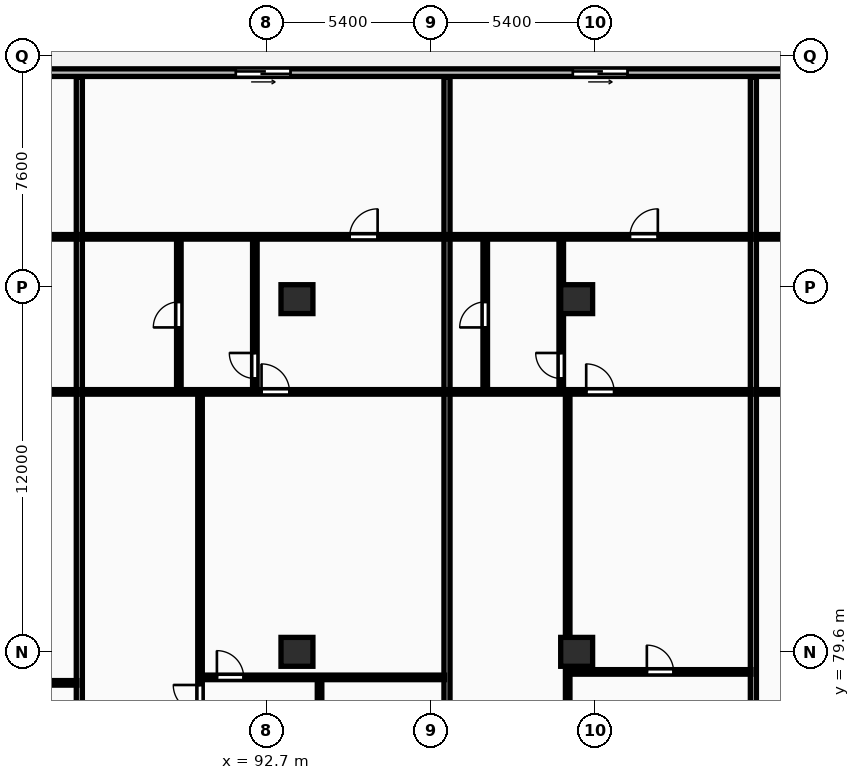
"""IFC4 building model, lengths in metres.
Left out: names, types, materials, properties, quantities, classifications, styles, units other than length and angle.
Written with IfcOpenShell. Run it as: python <this file> out.ifc"""

import sys

from ifc_helpers import new_model, si_unit, direction, frame, frame_2d, origin, origin_2d, place, context, subcontext, project, spatial, rectangle, extrude, element, fill, save


model = new_model("IFC4")
c1 = context("Model", 3, precision=1e-05, world=origin(), true_north=direction((0.0, 1.0)))
c2 = subcontext(c1, "Body", "Model", "MODEL_VIEW")
j1 = project(units=[si_unit("LENGTHUNIT", "METRE"), si_unit("PLANEANGLEUNIT", "RADIAN")], contexts=[c1])
p1 = place(None, origin())
s1 = spatial("IfcSite", under=j1, at=p1, CompositionType="ELEMENT")
p2 = place(p1, origin())
s2 = spatial("IfcBuilding", under=s1, at=p2, CompositionType="ELEMENT")
p3 = place(p2, frame((0.0, 0.0, 24.0)))
s3 = spatial("IfcBuildingStorey", under=s2, at=p3, CompositionType="ELEMENT", Elevation=24.0)
for number, where, z_axis, x_axis in (
    (1, (93.7, 79.6, 0.0), (0.0, 0.0, 1.0), (1.0, 0.0, 0.0)),
    (2, (93.7, 91.2, 0.0), (0.0, 0.0, 1.0), (1.0, 0.0, 0.0)),
    (3, (102.9, 79.6, 0.0), (0.0, 0.0, 1.0), (1.0, 0.0, 0.0)),
    (4, (102.9, 91.2, 0.0), (0.0, 0.0, 1.0), (1.0, 0.0, 0.0)),
):
    element("IfcColumn", number, at=place(p3, frame(where, z_axis=z_axis, x_axis=x_axis)), inside=s3, PredefinedType="COLUMN", context=c2, shape_type="SweptSolid", body=[
        extrude(rectangle(XDim=1.05, YDim=0.95, at=origin_2d()), origin(), (0.0, 0.0, 1.0), 3.25),
    ])
p4 = place(p3, frame((132.9, 98.65, 0.0), z_axis=(0.0, 0.0, 1.0), x_axis=(-1.0, 0.0, 0.0)))
e5 = element("IfcWall", 5, at=p4, inside=s3, PredefinedType="STANDARD", context=c2, shape_type="SweptSolid", body=[
    extrude(rectangle(XDim=77.6, YDim=0.25, at=frame_2d((38.8, 0.0))), origin(), (0.0, 0.0, 1.0), 2.97),
])
p5 = place(p4, frame((71.661, 0.0, 0.0)))
e6 = element("IfcOpeningElement", 6, at=p5, cuts=e5, PredefinedType="OPENING", context=c2, shape_type="SweptSolid", body=[
    extrude(rectangle(XDim=1.8, YDim=2.2, at=frame_2d((0.9, 1.1))), frame((0.0, 0.135, 0.0), z_axis=(0.0, -1.0, 0.0), x_axis=(1.0, 0.0, 0.0)), (0.0, 0.0, 1.0), 0.27),
])
p6 = place(p4, frame((61.079, 0.0, 0.0)))
e7 = element("IfcOpeningElement", 7, at=p6, cuts=e5, PredefinedType="OPENING", context=c2, shape_type="SweptSolid", body=[
    extrude(rectangle(XDim=1.8, YDim=2.2, at=frame_2d((0.9, 1.1))), frame((0.0, 0.135, 0.0), z_axis=(0.0, -1.0, 0.0), x_axis=(1.0, 0.0, 0.0)), (0.0, 0.0, 1.0), 0.27),
])
p7 = place(p4, frame((50.498, 0.0, 0.0)))
e8 = element("IfcOpeningElement", 8, at=p7, cuts=e5, PredefinedType="OPENING", context=c2, shape_type="SweptSolid", body=[
    extrude(rectangle(XDim=1.8, YDim=2.2, at=frame_2d((0.9, 1.1))), frame((0.0, 0.135, 0.0), z_axis=(0.0, -1.0, 0.0), x_axis=(1.0, 0.0, 0.0)), (0.0, 0.0, 1.0), 0.27),
])
p8 = place(p4, frame((39.412, 0.0, 0.0)))
e9 = element("IfcOpeningElement", 9, at=p8, cuts=e5, PredefinedType="OPENING", context=c2, shape_type="SweptSolid", body=[
    extrude(rectangle(XDim=1.8, YDim=2.2, at=frame_2d((0.9, 1.1))), frame((0.0, 0.135, 0.0), z_axis=(0.0, -1.0, 0.0), x_axis=(1.0, 0.0, 0.0)), (0.0, 0.0, 1.0), 0.27),
])
p9 = place(p4, frame((28.326, 0.0, 0.0)))
e10 = element("IfcOpeningElement", 10, at=p9, cuts=e5, PredefinedType="OPENING", context=c2, shape_type="SweptSolid", body=[
    extrude(rectangle(XDim=1.8, YDim=2.2, at=frame_2d((0.9, 1.1))), frame((0.0, 0.135, 0.0), z_axis=(0.0, -1.0, 0.0), x_axis=(1.0, 0.0, 0.0)), (0.0, 0.0, 1.0), 0.27),
])
p10 = place(p4, frame((17.744, 0.0, 0.0)))
e11 = element("IfcOpeningElement", 11, at=p10, cuts=e5, PredefinedType="OPENING", context=c2, shape_type="SweptSolid", body=[
    extrude(rectangle(XDim=1.8, YDim=2.2, at=frame_2d((0.9, 1.1))), frame((0.0, 0.135, 0.0), z_axis=(0.0, -1.0, 0.0), x_axis=(1.0, 0.0, 0.0)), (0.0, 0.0, 1.0), 0.27),
])
p11 = place(p4, frame((6.901, 0.0, 0.0)))
e12 = element("IfcOpeningElement", 12, at=p11, cuts=e5, PredefinedType="OPENING", context=c2, shape_type="SweptSolid", body=[
    extrude(rectangle(XDim=1.8, YDim=2.2, at=frame_2d((0.9, 1.1))), frame((0.0, 0.135, 0.0), z_axis=(0.0, -1.0, 0.0), x_axis=(1.0, 0.0, 0.0)), (0.0, 0.0, 1.0), 0.27),
])
p12 = place(p4, frame((0.6, 0.0, 0.85)))
e13 = element("IfcOpeningElement", 13, at=p12, cuts=e5, PredefinedType="OPENING", context=c2, shape_type="SweptSolid", body=[
    extrude(rectangle(XDim=1.8, YDim=1.8, at=frame_2d((0.9, 0.9))), frame((0.0, 0.135, 0.0), z_axis=(0.0, -1.0, 0.0), x_axis=(1.0, 0.0, 0.0)), (0.0, 0.0, 1.0), 0.27),
])
p13 = place(p3, frame((86.542, 69.43, 0.0), z_axis=(0.0, 0.0, 1.0), x_axis=(0.0, 1.0, 0.0)))
e14 = element("IfcWall", 14, at=p13, inside=s3, PredefinedType="PARTITIONING", context=c2, shape_type="SweptSolid", body=[
    extrude(rectangle(XDim=29.07, YDim=0.2, at=frame_2d((14.535, 0.0))), origin(), (0.0, 0.0, 1.0), 2.97),
])
p14 = place(p3, frame((80.494, 78.58, 0.0), z_axis=(0.0, 0.0, 1.0), x_axis=(1.0, 0.0, 0.0)))
e15 = element("IfcWall", 15, at=p14, inside=s3, PredefinedType="PARTITIONING", context=c2, shape_type="SweptSolid", body=[
    extrude(rectangle(XDim=5.968, YDim=0.15, at=frame_2d((2.984, 0.0))), origin(), (0.0, 0.0, 1.0), 2.97),
])
p15 = place(p14, frame((1.403, 0.0, 0.0)))
e16 = element("IfcOpeningElement", 16, at=p15, cuts=e15, PredefinedType="OPENING", context=c2, shape_type="SweptSolid", body=[
    extrude(rectangle(XDim=0.88, YDim=2.06, at=frame_2d((0.44, 1.03))), frame((0.0, 0.085, 0.0), z_axis=(0.0, -1.0, 0.0), x_axis=(1.0, 0.0, 0.0)), (0.0, 0.0, 1.0), 0.17),
])
p16 = place(p3, frame((76.544, 88.15, 0.0), z_axis=(0.0, 0.0, 1.0), x_axis=(1.0, 0.0, 0.0)))
e17 = element("IfcWall", 17, at=p16, inside=s3, PredefinedType="PARTITIONING", context=c2, shape_type="SweptSolid", body=[
    extrude(rectangle(XDim=9.918, YDim=0.15, at=frame_2d((4.959, 0.0))), origin(), (0.0, 0.0, 1.0), 2.97),
])
p17 = place(p16, frame((4.499, 0.0, 0.0)))
e18 = element("IfcOpeningElement", 18, at=p17, cuts=e17, PredefinedType="OPENING", context=c2, shape_type="SweptSolid", body=[
    extrude(rectangle(XDim=0.92, YDim=2.08, at=frame_2d((0.46, 1.04))), frame((0.0, 0.085, 0.0), z_axis=(0.0, -1.0, 0.0), x_axis=(1.0, 0.0, 0.0)), (0.0, 0.0, 1.0), 0.17),
])
p18 = place(p3, frame((76.544, 93.25, 0.0), z_axis=(0.0, 0.0, 1.0), x_axis=(1.0, 0.0, 0.0)))
e19 = element("IfcWall", 19, at=p18, inside=s3, PredefinedType="PARTITIONING", context=c2, shape_type="SweptSolid", body=[
    extrude(rectangle(XDim=9.918, YDim=0.15, at=frame_2d((4.959, 0.0))), origin(), (0.0, 0.0, 1.0), 2.97),
])
p19 = place(p18, frame((4.499, 0.0, 0.0)))
e20 = element("IfcOpeningElement", 20, at=p19, cuts=e19, PredefinedType="OPENING", context=c2, shape_type="SweptSolid", body=[
    extrude(rectangle(XDim=0.92, YDim=2.08, at=frame_2d((0.46, 1.04))), frame((0.0, 0.085, 0.0), z_axis=(0.0, -1.0, 0.0), x_axis=(1.0, 0.0, 0.0)), (0.0, 0.0, 1.0), 0.17),
])
p20 = place(p3, frame((98.635, 69.43, 0.0), z_axis=(0.0, 0.0, 1.0), x_axis=(0.0, 1.0, 0.0)))
e21 = element("IfcWall", 21, at=p20, inside=s3, PredefinedType="PARTITIONING", context=c2, shape_type="SweptSolid", body=[
    extrude(rectangle(XDim=29.07, YDim=0.2, at=frame_2d((14.535, 0.0))), origin(), (0.0, 0.0, 1.0), 2.97),
])
p21 = place(p3, frame((94.443, 69.41, 0.0), z_axis=(0.0, 0.0, 1.0), x_axis=(0.0, 1.0, 0.0)))
e22 = element("IfcWall", 22, at=p21, inside=s3, PredefinedType="PARTITIONING", context=c2, shape_type="SweptSolid", body=[
    extrude(rectangle(XDim=9.35, YDim=0.15, at=frame_2d((4.675, 0.0))), origin(), (0.0, 0.0, 1.0), 2.97),
])
p22 = place(p21, frame((4.255, 0.0, 0.0)))
e23 = element("IfcOpeningElement", 23, at=p22, cuts=e22, PredefinedType="OPENING", context=c2, shape_type="SweptSolid", body=[
    extrude(rectangle(XDim=0.84, YDim=2.04, at=frame_2d((0.42, 1.02))), frame((0.0, 0.085, 0.0), z_axis=(0.0, -1.0, 0.0), x_axis=(1.0, 0.0, 0.0)), (0.0, 0.0, 1.0), 0.17),
])
p23 = place(p3, frame((90.572, 78.76, 0.0), z_axis=(0.0, 0.0, 1.0), x_axis=(1.0, 0.0, 0.0)))
e24 = element("IfcWall", 24, at=p23, inside=s3, PredefinedType="PARTITIONING", context=c2, shape_type="SweptSolid", body=[
    extrude(rectangle(XDim=7.983, YDim=0.15, at=frame_2d((3.992, 0.0))), origin(), (0.0, 0.0, 1.0), 2.97),
])
p24 = place(p23, frame((0.495, 0.0, 0.0)))
e25 = element("IfcOpeningElement", 25, at=p24, cuts=e24, PredefinedType="OPENING", context=c2, shape_type="SweptSolid", body=[
    extrude(rectangle(XDim=0.88, YDim=2.06, at=frame_2d((0.44, 1.03))), frame((0.0, 0.085, 0.0), z_axis=(0.0, -1.0, 0.0), x_axis=(1.0, 0.0, 0.0)), (0.0, 0.0, 1.0), 0.17),
])
p25 = place(p3, frame((90.511, 69.41, 0.0), z_axis=(0.0, 0.0, 1.0), x_axis=(0.0, 1.0, 0.0)))
e26 = element("IfcWall", 26, at=p25, inside=s3, PredefinedType="PARTITIONING", context=c2, shape_type="SweptSolid", body=[
    extrude(rectangle(XDim=18.7, YDim=0.15, at=frame_2d((9.35, 0.0))), origin(), (0.0, 0.0, 1.0), 2.97),
])
p26 = place(p25, frame((8.22, 0.0, 0.0)))
e27 = element("IfcOpeningElement", 27, at=p26, cuts=e26, PredefinedType="OPENING", context=c2, shape_type="SweptSolid", body=[
    extrude(rectangle(XDim=0.88, YDim=2.06, at=frame_2d((0.44, 1.03))), frame((0.0, 0.085, 0.0), z_axis=(0.0, -1.0, 0.0), x_axis=(1.0, 0.0, 0.0)), (0.0, 0.0, 1.0), 0.17),
])
p27 = place(p3, frame((89.815, 88.19, 0.0), z_axis=(0.0, 0.0, 1.0), x_axis=(0.0, 1.0, 0.0)))
e28 = element("IfcWall", 28, at=p27, inside=s3, PredefinedType="PARTITIONING", context=c2, shape_type="SweptSolid", body=[
    extrude(rectangle(XDim=5.0, YDim=0.15, at=frame_2d((2.5, 0.0))), origin(), (0.0, 0.0, 1.0), 2.97),
])
p28 = place(p27, frame((2.08, 0.0, 0.0)))
e29 = element("IfcOpeningElement", 29, at=p28, cuts=e28, PredefinedType="OPENING", context=c2, shape_type="SweptSolid", body=[
    extrude(rectangle(XDim=0.84, YDim=2.04, at=frame_2d((0.42, 1.02))), frame((0.0, 0.085, 0.0), z_axis=(0.0, -1.0, 0.0), x_axis=(1.0, 0.0, 0.0)), (0.0, 0.0, 1.0), 0.17),
])
p29 = place(p3, frame((92.315, 88.19, 0.0), z_axis=(0.0, 0.0, 1.0), x_axis=(0.0, 1.0, 0.0)))
e30 = element("IfcWall", 30, at=p29, inside=s3, PredefinedType="PARTITIONING", context=c2, shape_type="SweptSolid", body=[
    extrude(rectangle(XDim=5.0, YDim=0.15, at=frame_2d((2.5, 0.0))), origin(), (0.0, 0.0, 1.0), 2.97),
])
p30 = place(p29, frame((0.4, 0.0, 0.0)))
e31 = element("IfcOpeningElement", 31, at=p30, cuts=e30, PredefinedType="OPENING", context=c2, shape_type="SweptSolid", body=[
    extrude(rectangle(XDim=0.84, YDim=2.04, at=frame_2d((0.42, 1.02))), frame((0.0, 0.085, 0.0), z_axis=(0.0, -1.0, 0.0), x_axis=(1.0, 0.0, 0.0)), (0.0, 0.0, 1.0), 0.17),
])
p31 = place(p3, frame((86.622, 88.15, 0.0), z_axis=(0.0, 0.0, 1.0), x_axis=(1.0, 0.0, 0.0)))
e32 = element("IfcWall", 32, at=p31, inside=s3, PredefinedType="PARTITIONING", context=c2, shape_type="SweptSolid", body=[
    extrude(rectangle(XDim=11.933, YDim=0.15, at=frame_2d((5.967, 0.0))), origin(), (0.0, 0.0, 1.0), 2.97),
])
p32 = place(p31, frame((5.914, 0.0, 0.0)))
e33 = element("IfcOpeningElement", 33, at=p32, cuts=e32, PredefinedType="OPENING", context=c2, shape_type="SweptSolid", body=[
    extrude(rectangle(XDim=0.92, YDim=2.08, at=frame_2d((0.46, 1.04))), frame((0.0, 0.085, 0.0), z_axis=(0.0, -1.0, 0.0), x_axis=(1.0, 0.0, 0.0)), (0.0, 0.0, 1.0), 0.17),
])
p33 = place(p3, frame((86.622, 93.25, 0.0), z_axis=(0.0, 0.0, 1.0), x_axis=(1.0, 0.0, 0.0)))
e34 = element("IfcWall", 34, at=p33, inside=s3, PredefinedType="PARTITIONING", context=c2, shape_type="SweptSolid", body=[
    extrude(rectangle(XDim=11.933, YDim=0.15, at=frame_2d((5.967, 0.0))), origin(), (0.0, 0.0, 1.0), 2.97),
])
p34 = place(p33, frame((8.812, 0.0, 0.0)))
e35 = element("IfcOpeningElement", 35, at=p34, cuts=e34, PredefinedType="OPENING", context=c2, shape_type="SweptSolid", body=[
    extrude(rectangle(XDim=0.92, YDim=2.08, at=frame_2d((0.46, 1.04))), frame((0.0, 0.085, 0.0), z_axis=(0.0, -1.0, 0.0), x_axis=(1.0, 0.0, 0.0)), (0.0, 0.0, 1.0), 0.17),
])
p35 = place(p3, frame((108.713, 69.43, 0.0), z_axis=(0.0, 0.0, 1.0), x_axis=(0.0, 1.0, 0.0)))
e36 = element("IfcWall", 36, at=p35, inside=s3, PredefinedType="PARTITIONING", context=c2, shape_type="SweptSolid", body=[
    extrude(rectangle(XDim=29.07, YDim=0.2, at=frame_2d((14.535, 0.0))), origin(), (0.0, 0.0, 1.0), 2.97),
])
p36 = place(p3, frame((102.665, 78.94, 0.0), z_axis=(0.0, 0.0, 1.0), x_axis=(1.0, 0.0, 0.0)))
e37 = element("IfcWall", 37, at=p36, inside=s3, PredefinedType="PARTITIONING", context=c2, shape_type="SweptSolid", body=[
    extrude(rectangle(XDim=5.968, YDim=0.15, at=frame_2d((2.984, 0.0))), origin(), (0.0, 0.0, 1.0), 2.97),
])
p37 = place(p36, frame((2.544, 0.0, 0.0)))
e38 = element("IfcOpeningElement", 38, at=p37, cuts=e37, PredefinedType="OPENING", context=c2, shape_type="SweptSolid", body=[
    extrude(rectangle(XDim=0.88, YDim=2.06, at=frame_2d((0.44, 1.03))), frame((0.0, 0.085, 0.0), z_axis=(0.0, -1.0, 0.0), x_axis=(1.0, 0.0, 0.0)), (0.0, 0.0, 1.0), 0.17),
])
p38 = place(p3, frame((102.605, 69.41, 0.0), z_axis=(0.0, 0.0, 1.0), x_axis=(0.0, 1.0, 0.0)))
e39 = element("IfcWall", 39, at=p38, inside=s3, PredefinedType="PARTITIONING", context=c2, shape_type="SweptSolid", body=[
    extrude(rectangle(XDim=18.7, YDim=0.15, at=frame_2d((9.35, 0.0))), origin(), (0.0, 0.0, 1.0), 2.22),
])
p39 = place(p38, frame((7.595, 0.0, 0.0)))
e40 = element("IfcOpeningElement", 40, at=p39, cuts=e39, PredefinedType="OPENING", context=c2, shape_type="SweptSolid", body=[
    extrude(rectangle(XDim=0.88, YDim=2.06, at=frame_2d((0.44, 1.03))), frame((0.0, 0.085, 0.0), z_axis=(0.0, -1.0, 0.0), x_axis=(1.0, 0.0, 0.0)), (0.0, 0.0, 1.0), 0.17),
])
p40 = place(p3, frame((99.893, 88.19, 0.0), z_axis=(0.0, 0.0, 1.0), x_axis=(0.0, 1.0, 0.0)))
e41 = element("IfcWall", 41, at=p40, inside=s3, PredefinedType="PARTITIONING", context=c2, shape_type="SweptSolid", body=[
    extrude(rectangle(XDim=5.0, YDim=0.15, at=frame_2d((2.5, 0.0))), origin(), (0.0, 0.0, 1.0), 2.97),
])
p41 = place(p40, frame((2.08, 0.0, 0.0)))
e42 = element("IfcOpeningElement", 42, at=p41, cuts=e41, PredefinedType="OPENING", context=c2, shape_type="SweptSolid", body=[
    extrude(rectangle(XDim=0.84, YDim=2.04, at=frame_2d((0.42, 1.02))), frame((0.0, 0.085, 0.0), z_axis=(0.0, -1.0, 0.0), x_axis=(1.0, 0.0, 0.0)), (0.0, 0.0, 1.0), 0.17),
])
p42 = place(p3, frame((102.393, 88.19, 0.0), z_axis=(0.0, 0.0, 1.0), x_axis=(0.0, 1.0, 0.0)))
e43 = element("IfcWall", 43, at=p42, inside=s3, PredefinedType="PARTITIONING", context=c2, shape_type="SweptSolid", body=[
    extrude(rectangle(XDim=5.0, YDim=0.15, at=frame_2d((2.5, 0.0))), origin(), (0.0, 0.0, 1.0), 2.97),
])
p43 = place(p42, frame((0.4, 0.0, 0.0)))
e44 = element("IfcOpeningElement", 44, at=p43, cuts=e43, PredefinedType="OPENING", context=c2, shape_type="SweptSolid", body=[
    extrude(rectangle(XDim=0.84, YDim=2.04, at=frame_2d((0.42, 1.02))), frame((0.0, 0.085, 0.0), z_axis=(0.0, -1.0, 0.0), x_axis=(1.0, 0.0, 0.0)), (0.0, 0.0, 1.0), 0.17),
])
p44 = place(p3, frame((98.715, 88.15, 0.0), z_axis=(0.0, 0.0, 1.0), x_axis=(1.0, 0.0, 0.0)))
e45 = element("IfcWall", 45, at=p44, inside=s3, PredefinedType="PARTITIONING", context=c2, shape_type="SweptSolid", body=[
    extrude(rectangle(XDim=9.918, YDim=0.15, at=frame_2d((4.959, 0.0))), origin(), (0.0, 0.0, 1.0), 2.97),
])
p45 = place(p44, frame((4.499, 0.0, 0.0)))
e46 = element("IfcOpeningElement", 46, at=p45, cuts=e45, PredefinedType="OPENING", context=c2, shape_type="SweptSolid", body=[
    extrude(rectangle(XDim=0.92, YDim=2.08, at=frame_2d((0.46, 1.04))), frame((0.0, 0.085, 0.0), z_axis=(0.0, -1.0, 0.0), x_axis=(1.0, 0.0, 0.0)), (0.0, 0.0, 1.0), 0.17),
])
p46 = place(p3, frame((98.715, 93.25, 0.0), z_axis=(0.0, 0.0, 1.0), x_axis=(1.0, 0.0, 0.0)))
e47 = element("IfcWall", 47, at=p46, inside=s3, PredefinedType="PARTITIONING", context=c2, shape_type="SweptSolid", body=[
    extrude(rectangle(XDim=9.918, YDim=0.15, at=frame_2d((4.959, 0.0))), origin(), (0.0, 0.0, 1.0), 2.97),
])
p47 = place(p46, frame((5.936, 0.0, 0.0)))
e48 = element("IfcOpeningElement", 48, at=p47, cuts=e47, PredefinedType="OPENING", context=c2, shape_type="SweptSolid", body=[
    extrude(rectangle(XDim=0.92, YDim=2.08, at=frame_2d((0.46, 1.04))), frame((0.0, 0.085, 0.0), z_axis=(0.0, -1.0, 0.0), x_axis=(1.0, 0.0, 0.0)), (0.0, 0.0, 1.0), 0.17),
])
p48 = place(p3, frame((108.793, 88.15, 0.0), z_axis=(0.0, 0.0, 1.0), x_axis=(1.0, 0.0, 0.0)))
e49 = element("IfcWall", 49, at=p48, inside=s3, PredefinedType="PARTITIONING", context=c2, shape_type="SweptSolid", body=[
    extrude(rectangle(XDim=10.926, YDim=0.15, at=frame_2d((5.463, 0.0))), origin(), (0.0, 0.0, 1.0), 2.97),
])
p49 = place(p48, frame((5.003, 0.0, 0.0)))
e50 = element("IfcOpeningElement", 50, at=p49, cuts=e49, PredefinedType="OPENING", context=c2, shape_type="SweptSolid", body=[
    extrude(rectangle(XDim=0.92, YDim=2.08, at=frame_2d((0.46, 1.04))), frame((0.0, 0.085, 0.0), z_axis=(0.0, -1.0, 0.0), x_axis=(1.0, 0.0, 0.0)), (0.0, 0.0, 1.0), 0.17),
])
p50 = place(p3, frame((108.793, 93.25, 0.0), z_axis=(0.0, 0.0, 1.0), x_axis=(1.0, 0.0, 0.0)))
e51 = element("IfcWall", 51, at=p50, inside=s3, PredefinedType="PARTITIONING", context=c2, shape_type="SweptSolid", body=[
    extrude(rectangle(XDim=10.926, YDim=0.15, at=frame_2d((5.463, 0.0))), origin(), (0.0, 0.0, 1.0), 2.97),
])
p51 = place(p50, frame((5.031, 0.0, 0.0)))
e52 = element("IfcOpeningElement", 52, at=p51, cuts=e51, PredefinedType="OPENING", context=c2, shape_type="SweptSolid", body=[
    extrude(rectangle(XDim=0.92, YDim=2.08, at=frame_2d((0.46, 1.04))), frame((0.0, 0.085, 0.0), z_axis=(0.0, -1.0, 0.0), x_axis=(1.0, 0.0, 0.0)), (0.0, 0.0, 1.0), 0.17),
])
p52 = place(p8, origin())
e53 = element("IfcDoor", 53, at=p52, inside=s3, OperationType="SLIDING_TO_LEFT", PredefinedType="DOOR", context=c2, shape_type="SweptSolid", body=[
    extrude(rectangle(XDim=1.8, YDim=2.2, at=frame_2d((0.9, 1.1))), frame((0.0, 0.025, 0.0), z_axis=(0.0, -1.0, 0.0), x_axis=(1.0, 0.0, 0.0)), (0.0, 0.0, 1.0), 0.05),
])
fill(e9, e53)
p53 = place(p9, origin())
e54 = element("IfcDoor", 54, at=p53, inside=s3, OperationType="SLIDING_TO_LEFT", PredefinedType="DOOR", context=c2, shape_type="SweptSolid", body=[
    extrude(rectangle(XDim=1.8, YDim=2.2, at=frame_2d((0.9, 1.1))), frame((0.0, 0.025, 0.0), z_axis=(0.0, -1.0, 0.0), x_axis=(1.0, 0.0, 0.0)), (0.0, 0.0, 1.0), 0.05),
])
fill(e10, e54)
p54 = place(p24, origin())
e55 = element("IfcDoor", 55, at=p54, inside=s3, OperationType="SINGLE_SWING_LEFT", PredefinedType="DOOR", context=c2, shape_type="SweptSolid", body=[
    extrude(rectangle(XDim=0.88, YDim=2.06, at=frame_2d((0.44, 1.03))), frame((0.0, 0.025, 0.0), z_axis=(0.0, -1.0, 0.0), x_axis=(1.0, 0.0, 0.0)), (0.0, 0.0, 1.0), 0.05),
])
fill(e25, e55)
p55 = place(p26, origin())
e56 = element("IfcDoor", 56, at=p55, inside=s3, OperationType="SINGLE_SWING_RIGHT", PredefinedType="DOOR", context=c2, shape_type="SweptSolid", body=[
    extrude(rectangle(XDim=0.88, YDim=2.06, at=frame_2d((0.44, 1.03))), frame((0.0, 0.025, 0.0), z_axis=(0.0, -1.0, 0.0), x_axis=(1.0, 0.0, 0.0)), (0.0, 0.0, 1.0), 0.05),
])
fill(e27, e56)
p56 = place(p28, origin())
e57 = element("IfcDoor", 57, at=p56, inside=s3, OperationType="SINGLE_SWING_LEFT", PredefinedType="DOOR", context=c2, shape_type="SweptSolid", body=[
    extrude(rectangle(XDim=0.84, YDim=2.04, at=frame_2d((0.42, 1.02))), frame((0.0, 0.025, 0.0), z_axis=(0.0, -1.0, 0.0), x_axis=(1.0, 0.0, 0.0)), (0.0, 0.0, 1.0), 0.05),
])
fill(e29, e57)
p57 = place(p30, origin())
e58 = element("IfcDoor", 58, at=p57, inside=s3, OperationType="SINGLE_SWING_RIGHT", PredefinedType="DOOR", context=c2, shape_type="SweptSolid", body=[
    extrude(rectangle(XDim=0.84, YDim=2.04, at=frame_2d((0.42, 1.02))), frame((0.0, 0.025, 0.0), z_axis=(0.0, -1.0, 0.0), x_axis=(1.0, 0.0, 0.0)), (0.0, 0.0, 1.0), 0.05),
])
fill(e31, e58)
p58 = place(p32, origin())
e59 = element("IfcDoor", 59, at=p58, inside=s3, OperationType="SINGLE_SWING_LEFT", PredefinedType="DOOR", context=c2, shape_type="SweptSolid", body=[
    extrude(rectangle(XDim=0.92, YDim=2.08, at=frame_2d((0.46, 1.04))), frame((0.0, 0.025, 0.0), z_axis=(0.0, -1.0, 0.0), x_axis=(1.0, 0.0, 0.0)), (0.0, 0.0, 1.0), 0.05),
])
fill(e33, e59)
p59 = place(p34, origin())
e60 = element("IfcDoor", 60, at=p59, inside=s3, OperationType="SINGLE_SWING_RIGHT", PredefinedType="DOOR", context=c2, shape_type="SweptSolid", body=[
    extrude(rectangle(XDim=0.92, YDim=2.08, at=frame_2d((0.46, 1.04))), frame((0.0, 0.025, 0.0), z_axis=(0.0, -1.0, 0.0), x_axis=(1.0, 0.0, 0.0)), (0.0, 0.0, 1.0), 0.05),
])
fill(e35, e60)
p60 = place(p37, origin())
e61 = element("IfcDoor", 61, at=p60, inside=s3, OperationType="SINGLE_SWING_LEFT", PredefinedType="DOOR", context=c2, shape_type="SweptSolid", body=[
    extrude(rectangle(XDim=0.88, YDim=2.06, at=frame_2d((0.44, 1.03))), frame((0.0, 0.025, 0.0), z_axis=(0.0, -1.0, 0.0), x_axis=(1.0, 0.0, 0.0)), (0.0, 0.0, 1.0), 0.05),
])
fill(e38, e61)
p61 = place(p41, origin())
e62 = element("IfcDoor", 62, at=p61, inside=s3, OperationType="SINGLE_SWING_LEFT", PredefinedType="DOOR", context=c2, shape_type="SweptSolid", body=[
    extrude(rectangle(XDim=0.84, YDim=2.04, at=frame_2d((0.42, 1.02))), frame((0.0, 0.025, 0.0), z_axis=(0.0, -1.0, 0.0), x_axis=(1.0, 0.0, 0.0)), (0.0, 0.0, 1.0), 0.05),
])
fill(e42, e62)
p62 = place(p43, origin())
e63 = element("IfcDoor", 63, at=p62, inside=s3, OperationType="SINGLE_SWING_RIGHT", PredefinedType="DOOR", context=c2, shape_type="SweptSolid", body=[
    extrude(rectangle(XDim=0.84, YDim=2.04, at=frame_2d((0.42, 1.02))), frame((0.0, 0.025, 0.0), z_axis=(0.0, -1.0, 0.0), x_axis=(1.0, 0.0, 0.0)), (0.0, 0.0, 1.0), 0.05),
])
fill(e44, e63)
p63 = place(p45, origin())
e64 = element("IfcDoor", 64, at=p63, inside=s3, OperationType="SINGLE_SWING_LEFT", PredefinedType="DOOR", context=c2, shape_type="SweptSolid", body=[
    extrude(rectangle(XDim=0.92, YDim=2.08, at=frame_2d((0.46, 1.04))), frame((0.0, 0.025, 0.0), z_axis=(0.0, -1.0, 0.0), x_axis=(1.0, 0.0, 0.0)), (0.0, 0.0, 1.0), 0.05),
])
fill(e46, e64)
p64 = place(p47, origin())
e65 = element("IfcDoor", 65, at=p64, inside=s3, OperationType="SINGLE_SWING_RIGHT", PredefinedType="DOOR", context=c2, shape_type="SweptSolid", body=[
    extrude(rectangle(XDim=0.92, YDim=2.08, at=frame_2d((0.46, 1.04))), frame((0.0, 0.025, 0.0), z_axis=(0.0, -1.0, 0.0), x_axis=(1.0, 0.0, 0.0)), (0.0, 0.0, 1.0), 0.05),
])
fill(e48, e65)
save(model, sys.argv[1])
